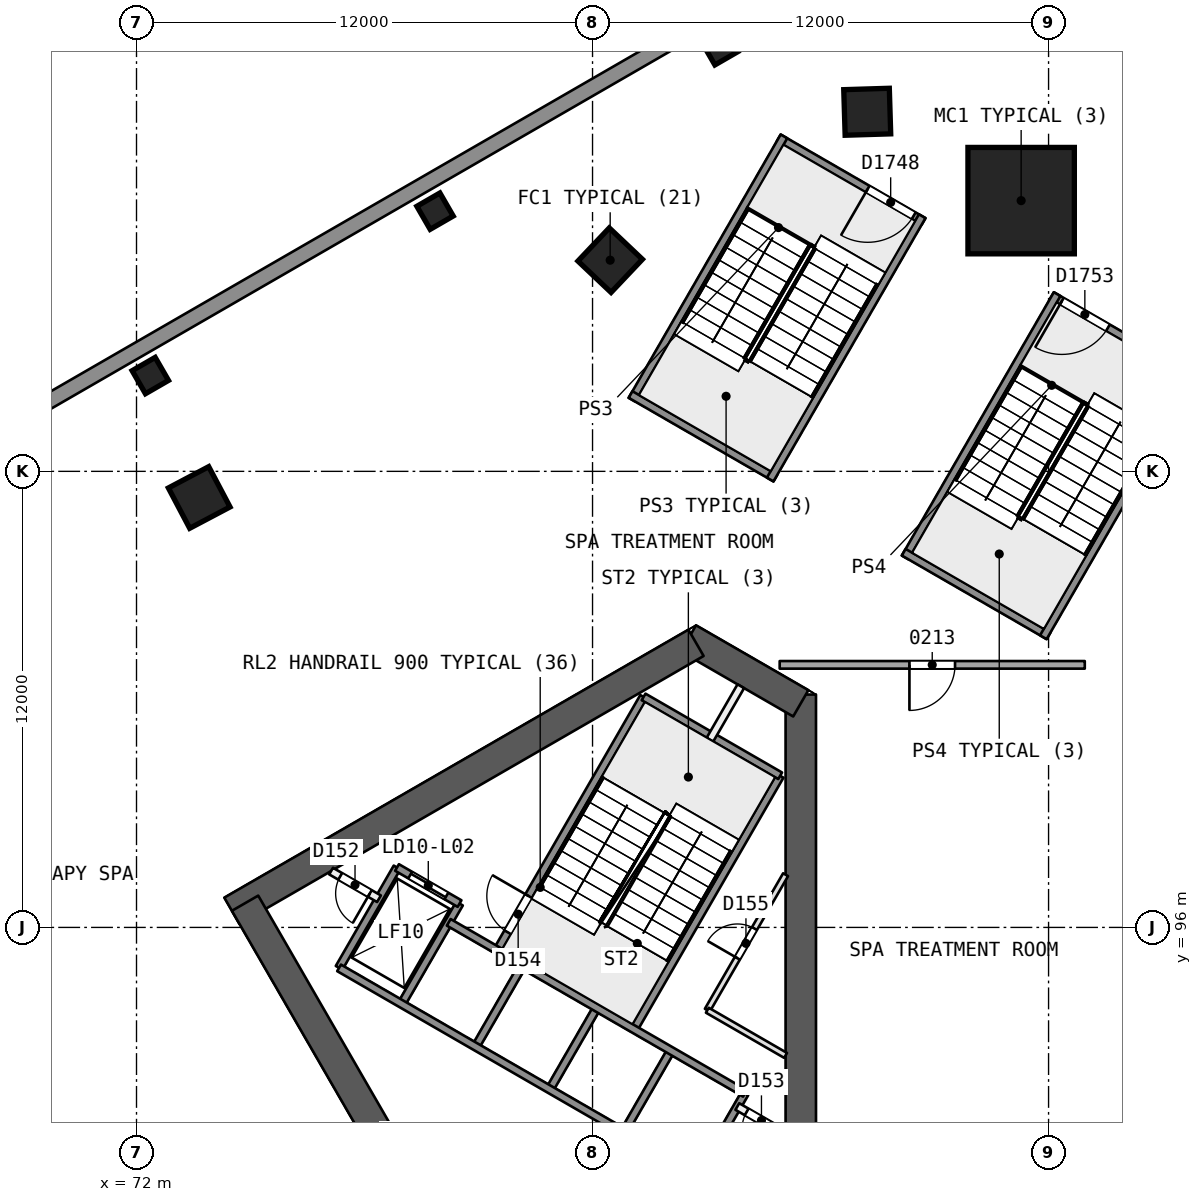
"""IFC4 building model, lengths in metres.
Left out: names, types, materials, properties, quantities, classifications, styles, units other than length and angle.
Written with IfcOpenShell. Run it as: python <this file> out.ifc"""

import sys

from ifc_helpers import new_model, si_unit, direction, frame, frame_2d, origin, origin_2d, place, context, subcontext, project, spatial, rectangle, extrude, element, fill, save


model = new_model("IFC4")
c1 = context("Model", 3, precision=1e-05, world=origin(), true_north=direction((0.0, 1.0)))
c2 = subcontext(c1, "Body", "Model", "MODEL_VIEW")
j1 = project(units=[si_unit("LENGTHUNIT", "METRE"), si_unit("PLANEANGLEUNIT", "RADIAN")], contexts=[c1])
p1 = place(None, origin())
s1 = spatial("IfcSite", under=j1, at=p1, CompositionType="ELEMENT")
p2 = place(p1, origin())
s2 = spatial("IfcBuilding", under=s1, at=p2, CompositionType="ELEMENT")
p3 = place(p2, frame((0.0, 0.0, 15.0)))
s3 = spatial("IfcBuildingStorey", under=s2, at=p3, CompositionType="ELEMENT", Elevation=15.0)
p4 = place(p3, frame((89.48, 88.194, 0.0), z_axis=(0.0, 0.0, 1.0), x_axis=(0.0, 1.0, 0.0)))
e1 = element("IfcWall", 1, at=p4, inside=s3, PredefinedType="SHEAR", context=c2, shape_type="SweptSolid", body=[
    extrude(rectangle(XDim=13.933, YDim=0.8, at=frame_2d((6.967, 0.0))), origin(), (0.0, 0.0, 1.0), 5.4),
])
p5 = place(p3, frame((89.48, 101.897, 0.0), z_axis=(0.0, 0.0, 1.0), x_axis=(-0.866034355626, 0.499984494636, 0.0)))
e2 = element("IfcWall", 2, at=p5, inside=s3, PredefinedType="SHEAR", context=c2, shape_type="SweptSolid", body=[
    extrude(rectangle(XDim=3.414, YDim=0.8, at=frame_2d((1.707, 0.0))), origin(), (0.0, 0.0, 1.0), 5.4),
])
p6 = place(p3, frame((86.723, 103.488, 0.0), z_axis=(0.0, 0.0, 1.0), x_axis=(-0.866032504327, -0.499987701298, 0.0)))
e3 = element("IfcWall", 3, at=p6, inside=s3, PredefinedType="SHEAR", context=c2, shape_type="SweptSolid", body=[
    extrude(rectangle(XDim=14.102, YDim=0.8, at=frame_2d((7.051, 0.0))), origin(), (0.0, 0.0, 1.0), 5.4),
])
p7 = place(p3, frame((74.856, 96.637, 0.0), z_axis=(0.0, 0.0, 1.0), x_axis=(0.499993500917, -0.866029155999, 0.0)))
e4 = element("IfcWall", 4, at=p7, inside=s3, PredefinedType="SHEAR", context=c2, shape_type="SweptSolid", body=[
    extrude(rectangle(XDim=9.98, YDim=0.8, at=frame_2d((4.99, 0.0))), origin(), (0.0, 0.0, 1.0), 5.4),
])
p8 = place(p7, frame((7.83, 0.0, 0.0)))
e5 = element("IfcOpeningElement", 5, at=p8, cuts=e4, PredefinedType="OPENING", context=c2, shape_type="SweptSolid", body=[
    extrude(rectangle(XDim=1.2, YDim=2.1, at=frame_2d((0.6, 1.05))), frame((0.0, 0.411, 0.0), z_axis=(0.0, -1.0, 0.0), x_axis=(1.0, 0.0, 0.0)), (0.0, 0.0, 1.0), 0.821),
])
p9 = place(p3, frame((95.3, 115.16, 0.0), z_axis=(-0.017576585263, -0.030499216073, 0.999380238683), x_axis=(0.499009854814, 0.865881069356, 0.035201399554)))
e6 = element("IfcColumn", 6, at=p9, inside=s3, PredefinedType="COLUMN", context=c2, shape_type="SweptSolid", body=[
    extrude(rectangle(XDim=2.8, YDim=2.8, at=origin_2d()), origin(), (0.0, 0.0, 1.0), 5.403),
])
p10 = place(p3, frame((84.474, 113.59, 0.0), z_axis=(-0.008405819998, -0.028109785153, 0.999569498419), x_axis=(0.866589254109, 0.49856697269, 0.021308176972)))
e7 = element("IfcColumn", 7, at=p10, inside=s3, PredefinedType="COLUMN", context=c2, shape_type="SweptSolid", body=[
    extrude(rectangle(XDim=1.2, YDim=1.2, at=origin_2d()), origin(), (0.0, 0.0, 1.0), 5.402),
])
p11 = place(p3, frame((73.649, 107.34, 0.0), z_axis=(0.000858805594, -0.02278094838, 0.999740111651), x_axis=(0.865998283321, 0.499933588876, 0.010648004404)))
e8 = element("IfcColumn", 8, at=p11, inside=s3, PredefinedType="COLUMN", context=c2, shape_type="SweptSolid", body=[
    extrude(rectangle(XDim=1.2, YDim=1.2, at=origin_2d()), origin(), (0.0, 0.0, 1.0), 5.401),
])
p12 = place(p3, frame((91.246, 117.5, 0.0), z_axis=(-0.015001048022, -0.031945002866, 0.999377048641), x_axis=(0.917716531026, -0.397234448643, 0.001077725523)))
e9 = element("IfcColumn", 9, at=p12, inside=s3, PredefinedType="COLUMN", context=c2, shape_type="SweptSolid", body=[
    extrude(rectangle(XDim=1.2, YDim=1.2, at=origin_2d()), origin(), (0.0, 0.0, 1.0), 5.403),
])
for number, where, z_axis, x_axis in (
    (10, (87.348, 119.172, 0.0), (0.0, 0.0, 1.0), (0.866, 0.5, 0.0)),
    (11, (79.855, 114.846, 0.0), (0.0, 0.0, 1.0), (0.866, 0.5, 0.0)),
    (12, (72.363, 110.521, 0.0), (0.0, 0.0, 1.0), (0.866, 0.5, 0.0)),
):
    element("IfcColumn", number, at=place(p3, frame(where, z_axis=z_axis, x_axis=x_axis)), inside=s3, PredefinedType="COLUMN", context=c2, shape_type="SweptSolid", body=[
        extrude(rectangle(XDim=0.7, YDim=0.7, at=origin_2d()), origin(), (0.0, 0.0, 1.0), 5.4),
    ])
p13 = place(p3, frame((96.953, 102.909, 0.0), z_axis=(0.0, 0.0, 1.0), x_axis=(-1.0, 0.0, 0.0)))
e13 = element("IfcWall", 13, at=p13, inside=s3, PredefinedType="PARTITIONING", context=c2, shape_type="SweptSolid", body=[
    extrude(rectangle(XDim=8.028, YDim=0.2, at=frame_2d((4.014, 0.0))), origin(), (0.0, 0.0, 1.0), 5.0),
])
p14 = place(p13, frame((3.414, 0.0, 0.0)))
e14 = element("IfcOpeningElement", 14, at=p14, cuts=e13, PredefinedType="OPENING", context=c2, shape_type="SweptSolid", body=[
    extrude(rectangle(XDim=1.2, YDim=2.4, at=frame_2d((0.6, 1.2))), frame((0.0, 0.11, 0.0), z_axis=(0.0, -1.0, 0.0), x_axis=(1.0, 0.0, 0.0)), (0.0, 0.0, 1.0), 0.221),
])
p15 = place(p3, frame((26.66, 85.0, 0.0), z_axis=(0.0, 0.0, 1.0), x_axis=(0.866025599265, 0.499999661418, 0.0)))
e15 = element("IfcWall", 15, at=p15, inside=s3, PredefinedType="SOLIDWALL", context=c2, shape_type="SweptSolid", body=[
    extrude(rectangle(XDim=78.727, YDim=0.4, at=frame_2d((39.364, 0.0))), origin(), (0.0, 0.0, 1.0), 5.0),
])
p16 = place(p15, frame((42.061, 0.0, 0.9)))
e16 = element("IfcOpeningElement", 16, at=p16, cuts=e15, PredefinedType="OPENING", context=c2, shape_type="SweptSolid", body=[
    extrude(rectangle(XDim=2.4, YDim=2.4, at=frame_2d((1.2, 1.2))), frame((0.0, 0.21, 0.0), z_axis=(0.0, -1.0, 0.0), x_axis=(1.0, 0.0, 0.0)), (0.0, 0.0, 1.0), 0.421),
])
p17 = place(p15, frame((34.267, 0.0, 0.9)))
e17 = element("IfcOpeningElement", 17, at=p17, cuts=e15, PredefinedType="OPENING", context=c2, shape_type="SweptSolid", body=[
    extrude(rectangle(XDim=2.4, YDim=2.4, at=frame_2d((1.2, 1.2))), frame((0.0, 0.21, 0.0), z_axis=(0.0, -1.0, 0.0), x_axis=(1.0, 0.0, 0.0)), (0.0, 0.0, 1.0), 0.421),
])
p18 = place(p3, frame((86.77, 89.486, 0.0), z_axis=(0.0, 0.0, 1.0), x_axis=(0.499961042966, 0.86604789447, 0.0)))
e18 = element("IfcWall", 18, at=p18, inside=s3, PredefinedType="SOLIDWALL", context=c2, shape_type="SweptSolid", body=[
    extrude(rectangle(XDim=2.48, YDim=0.2, at=frame_2d((1.24, 0.0))), origin(), (0.0, 0.0, 1.0), 5.0),
])
p19 = place(p3, frame((87.021, 93.821, 0.0), z_axis=(0.0, 0.0, 1.0), x_axis=(0.500028662945, 0.866008854593, 0.0)))
e19 = element("IfcWall", 19, at=p19, inside=s3, PredefinedType="PARTITIONING", context=c2, shape_type="SweptSolid", body=[
    extrude(rectangle(XDim=4.118, YDim=0.15, at=frame_2d((2.059, 0.0))), origin(), (0.0, 0.0, 1.0), 5.0),
])
p20 = place(p19, frame((1.582, 0.0, 0.0)))
e20 = element("IfcOpeningElement", 20, at=p20, cuts=e19, PredefinedType="OPENING", context=c2, shape_type="SweptSolid", body=[
    extrude(rectangle(XDim=0.9, YDim=2.1, at=frame_2d((0.45, 1.05))), frame((0.0, 0.085, 0.0), z_axis=(0.0, -1.0, 0.0), x_axis=(1.0, 0.0, 0.0)), (0.0, 0.0, 1.0), 0.171),
])
p21 = place(p3, frame((84.821, 90.611, 0.0), z_axis=(0.0, 0.0, 1.0), x_axis=(0.499961042966, 0.86604789447, 0.0)))
e21 = element("IfcWall", 21, at=p21, inside=s3, PredefinedType="SOLIDWALL", context=c2, shape_type="SweptSolid", body=[
    extrude(rectangle(XDim=2.48, YDim=0.2, at=frame_2d((1.24, 0.0))), origin(), (0.0, 0.0, 1.0), 5.0),
])
p22 = place(p3, frame((85.087, 93.321, 0.0), z_axis=(0.0, 0.0, 1.0), x_axis=(0.500019787375, 0.866013979237, 0.0)))
e22 = element("IfcWall", 22, at=p22, inside=s3, PredefinedType="SOLIDWALL", context=c2, shape_type="SweptSolid", body=[
    extrude(rectangle(XDim=7.7, YDim=0.2, at=frame_2d((3.85, 0.0))), origin(), (0.0, 0.0, 1.0), 5.0),
])
p23 = place(p3, frame((82.873, 91.736, 0.0), z_axis=(0.0, 0.0, 1.0), x_axis=(0.499961042966, 0.86604789447, 0.0)))
e23 = element("IfcWall", 23, at=p23, inside=s3, PredefinedType="SOLIDWALL", context=c2, shape_type="SweptSolid", body=[
    extrude(rectangle(XDim=2.48, YDim=0.2, at=frame_2d((1.24, 0.0))), origin(), (0.0, 0.0, 1.0), 5.0),
])
p24 = place(p3, frame((87.09, 100.94, 0.0), z_axis=(0.0, 0.0, 1.0), x_axis=(0.499956811548, 0.866050337213, 0.0)))
e24 = element("IfcWall", 24, at=p24, inside=s3, PredefinedType="PARTITIONING", context=c2, shape_type="SweptSolid", body=[
    extrude(rectangle(XDim=1.623, YDim=0.2, at=frame_2d((0.812, 0.0))), origin(), (0.0, 0.0, 1.0), 5.0),
])
p25 = place(p3, frame((80.924, 92.861, 0.0), z_axis=(0.0, 0.0, 1.0), x_axis=(0.499961042966, 0.86604789447, 0.0)))
e25 = element("IfcWall", 25, at=p25, inside=s3, PredefinedType="SOLIDWALL", context=c2, shape_type="SweptSolid", body=[
    extrude(rectangle(XDim=2.48, YDim=0.2, at=frame_2d((1.24, 0.0))), origin(), (0.0, 0.0, 1.0), 5.0),
])
p26 = place(p3, frame((81.493, 95.396, 0.0), z_axis=(0.0, 0.0, 1.0), x_axis=(0.500006057782, 0.866021906294, 0.0)))
e26 = element("IfcWall", 26, at=p26, inside=s3, PredefinedType="SOLIDWALL", context=c2, shape_type="SweptSolid", body=[
    extrude(rectangle(XDim=7.7, YDim=0.2, at=frame_2d((3.85, 0.0))), origin(), (0.0, 0.0, 1.0), 5.0),
])
p27 = place(p26, frame((0.55, 0.0, 0.0)))
e27 = element("IfcOpeningElement", 27, at=p27, cuts=e26, PredefinedType="OPENING", context=c2, shape_type="SweptSolid", body=[
    extrude(rectangle(XDim=1.1, YDim=2.1, at=frame_2d((0.55, 1.05))), frame((0.0, 0.11, 0.0), z_axis=(0.0, -1.0, 0.0), x_axis=(1.0, 0.0, 0.0)), (0.0, 0.0, 1.0), 0.221),
])
for number, where, z_axis, x_axis in (
    (28, (78.976, 93.986, 0.0), (0.0, 0.0, 1.0), (0.5, 0.866, 0.0)),
    (29, (77.33, 94.936, 0.0), (0.0, 0.0, 1.0), (0.5, 0.866, 0.0)),
):
    element("IfcWall", number, at=place(p3, frame(where, z_axis=z_axis, x_axis=x_axis)), inside=s3, PredefinedType="SOLIDWALL", context=c2, shape_type="SweptSolid", body=[
        extrude(rectangle(XDim=3.05, YDim=0.2, at=frame_2d((1.525, 0.0))), origin(), (0.0, 0.0, 1.0), 5.0),
    ])
p28 = place(p3, frame((86.77, 89.486, 0.0), z_axis=(0.0, 0.0, 1.0), x_axis=(-0.86601811187, 0.500012629753, 0.0)))
e30 = element("IfcWall", 30, at=p28, inside=s3, PredefinedType="SOLIDWALL", context=c2, shape_type="SweptSolid", body=[
    extrude(rectangle(XDim=10.9, YDim=0.2, at=frame_2d((5.45, 0.0))), origin(), (0.0, 0.0, 1.0), 5.0),
])
p29 = place(p3, frame((89.08, 90.554, 0.0), z_axis=(0.0, 0.0, 1.0), x_axis=(-0.866022048785, 0.500005810984, 0.0)))
e31 = element("IfcWall", 31, at=p29, inside=s3, PredefinedType="PARTITIONING", context=c2, shape_type="SweptSolid", body=[
    extrude(rectangle(XDim=1.467, YDim=0.2, at=frame_2d((0.733, 0.0))), origin(), (0.0, 0.0, 1.0), 5.0),
])
p30 = place(p29, frame((0.283, 0.0, 0.0)))
e32 = element("IfcOpeningElement", 32, at=p30, cuts=e31, PredefinedType="OPENING", context=c2, shape_type="SweptSolid", body=[
    extrude(rectangle(XDim=0.9, YDim=2.1, at=frame_2d((0.45, 1.05))), frame((0.0, 0.11, 0.0), z_axis=(0.0, -1.0, 0.0), x_axis=(1.0, 0.0, 0.0)), (0.0, 0.0, 1.0), 0.221),
])
p31 = place(p3, frame((78.38, 96.755, 0.0), z_axis=(0.0, 0.0, 1.0), x_axis=(-0.866003949776, 0.500037157592, 0.0)))
e33 = element("IfcWall", 33, at=p31, inside=s3, PredefinedType="PARTITIONING", context=c2, shape_type="SweptSolid", body=[
    extrude(rectangle(XDim=1.455, YDim=0.2, at=frame_2d((0.728, 0.0))), origin(), (0.0, 0.0, 1.0), 5.0),
])
p32 = place(p31, frame((0.278, 0.0, 0.0)))
e34 = element("IfcOpeningElement", 34, at=p32, cuts=e33, PredefinedType="OPENING", context=c2, shape_type="SweptSolid", body=[
    extrude(rectangle(XDim=0.9, YDim=2.1, at=frame_2d((0.45, 1.05))), frame((0.0, 0.11, 0.0), z_axis=(0.0, -1.0, 0.0), x_axis=(1.0, 0.0, 0.0)), (0.0, 0.0, 1.0), 0.221),
])
p33 = place(p3, frame((88.01, 91.634, 0.0), z_axis=(0.0, 0.0, 1.0), x_axis=(-0.866024315419, 0.5000018851, 0.0)))
e35 = element("IfcWall", 35, at=p33, inside=s3, PredefinedType="SOLIDWALL", context=c2, shape_type="SweptSolid", body=[
    extrude(rectangle(XDim=9.0, YDim=0.2, at=frame_2d((4.5, 0.0))), origin(), (0.0, 0.0, 1.0), 5.0),
])
p34 = place(p3, frame((80.5, 96.627, 0.0), z_axis=(0.0, 0.0, 1.0), x_axis=(-0.86601224135, 0.500022797313, 0.0)))
e36 = element("IfcWall", 36, at=p34, inside=s3, PredefinedType="SOLIDWALL", context=c2, shape_type="SweptSolid", body=[
    extrude(rectangle(XDim=1.9, YDim=0.2, at=frame_2d((0.95, 0.0))), origin(), (0.0, 0.0, 1.0), 5.0),
])
p35 = place(p34, frame((0.4, 0.0, 0.0)))
e37 = element("IfcOpeningElement", 37, at=p35, cuts=e36, PredefinedType="OPENING", context=c2, shape_type="SweptSolid", body=[
    extrude(rectangle(XDim=1.1, YDim=2.1, at=frame_2d((0.55, 1.05))), frame((0.0, 0.11, 0.0), z_axis=(0.0, -1.0, 0.0), x_axis=(1.0, 0.0, 0.0)), (0.0, 0.0, 1.0), 0.221),
])
p36 = place(p3, frame((89.08, 92.632, 0.0), z_axis=(0.0, 0.0, 1.0), x_axis=(-0.866041951395, 0.499971337603, 0.0)))
e38 = element("IfcWall", 38, at=p36, inside=s3, PredefinedType="PARTITIONING", context=c2, shape_type="SweptSolid", body=[
    extrude(rectangle(XDim=2.378, YDim=0.15, at=frame_2d((1.189, 0.0))), origin(), (0.0, 0.0, 1.0), 5.0),
])
p37 = place(p3, frame((88.937, 99.99, 0.0), z_axis=(0.0, 0.0, 1.0), x_axis=(-0.866004344652, 0.500036473714, 0.0)))
e39 = element("IfcWall", 39, at=p37, inside=s3, PredefinedType="SOLIDWALL", context=c2, shape_type="SweptSolid", body=[
    extrude(rectangle(XDim=4.15, YDim=0.2, at=frame_2d((2.075, 0.0))), origin(), (0.0, 0.0, 1.0), 5.0),
])
p38 = place(p3, frame((92.711, 114.577, -0.4), z_axis=(0.0, 0.0, 1.0), x_axis=(-0.866032203192, 0.499988222896, 0.0)))
e40 = element("IfcWall", 40, at=p38, inside=s3, PredefinedType="SOLIDWALL", context=c2, shape_type="SweptSolid", body=[
    extrude(rectangle(XDim=4.4, YDim=0.2, at=frame_2d((2.2, 0.0))), origin(), (0.0, 0.0, 1.0), 5.4),
])
p39 = place(p38, frame((0.3, 0.0, 0.4)))
e41 = element("IfcOpeningElement", 41, at=p39, cuts=e40, PredefinedType="OPENING", context=c2, shape_type="SweptSolid", body=[
    extrude(rectangle(XDim=1.4, YDim=2.1, at=frame_2d((0.7, 1.05))), frame((0.0, 0.11, 0.0), z_axis=(0.0, -1.0, 0.0), x_axis=(1.0, 0.0, 0.0)), (0.0, 0.0, 1.0), 0.221),
])
p40 = place(p3, frame((89.037, 116.813, -0.4), z_axis=(0.0, 0.0, 1.0), x_axis=(-0.49999894854, -0.866026010844, 0.0)))
e42 = element("IfcWall", 42, at=p40, inside=s3, PredefinedType="SOLIDWALL", context=c2, shape_type="SweptSolid", body=[
    extrude(rectangle(XDim=8.0, YDim=0.2, at=frame_2d((4.0, 0.0))), origin(), (0.0, 0.0, 1.0), 5.4),
])
p41 = place(p3, frame((85.001, 110.022, -0.4), z_axis=(0.0, 0.0, 1.0), x_axis=(0.866032203192, -0.499988222896, 0.0)))
e43 = element("IfcWall", 43, at=p41, inside=s3, PredefinedType="SOLIDWALL", context=c2, shape_type="SweptSolid", body=[
    extrude(rectangle(XDim=4.4, YDim=0.2, at=frame_2d((2.2, 0.0))), origin(), (0.0, 0.0, 1.0), 5.4),
])
p42 = place(p3, frame((88.675, 107.785, -0.4), z_axis=(0.0, 0.0, 1.0), x_axis=(0.49999894854, 0.866026010844, 0.0)))
e44 = element("IfcWall", 44, at=p42, inside=s3, PredefinedType="SOLIDWALL", context=c2, shape_type="SweptSolid", body=[
    extrude(rectangle(XDim=8.0, YDim=0.2, at=frame_2d((4.0, 0.0))), origin(), (0.0, 0.0, 1.0), 5.4),
])
p43 = place(p3, frame((99.899, 110.427, -0.4), z_axis=(0.0, 0.0, 1.0), x_axis=(-0.866018331238, 0.50001224981, 0.0)))
e45 = element("IfcWall", 45, at=p43, inside=s3, PredefinedType="SOLIDWALL", context=c2, shape_type="SweptSolid", body=[
    extrude(rectangle(XDim=4.4, YDim=0.2, at=frame_2d((2.2, 0.0))), origin(), (0.0, 0.0, 1.0), 5.4),
])
p44 = place(p43, frame((2.7, 0.0, 0.4)))
e46 = element("IfcOpeningElement", 46, at=p44, cuts=e45, PredefinedType="OPENING", context=c2, shape_type="SweptSolid", body=[
    extrude(rectangle(XDim=1.4, YDim=2.1, at=frame_2d((0.7, 1.05))), frame((0.0, 0.11, 0.0), z_axis=(0.0, -1.0, 0.0), x_axis=(1.0, 0.0, 0.0)), (0.0, 0.0, 1.0), 0.221),
])
p45 = place(p3, frame((96.225, 112.663, -0.4), z_axis=(0.0, 0.0, 1.0), x_axis=(-0.49999894854, -0.866026010844, 0.0)))
e47 = element("IfcWall", 47, at=p45, inside=s3, PredefinedType="SOLIDWALL", context=c2, shape_type="SweptSolid", body=[
    extrude(rectangle(XDim=8.0, YDim=0.2, at=frame_2d((4.0, 0.0))), origin(), (0.0, 0.0, 1.0), 5.4),
])
p46 = place(p3, frame((92.189, 105.872, -0.4), z_axis=(0.0, 0.0, 1.0), x_axis=(0.866032203192, -0.499988222896, 0.0)))
e48 = element("IfcWall", 48, at=p46, inside=s3, PredefinedType="SOLIDWALL", context=c2, shape_type="SweptSolid", body=[
    extrude(rectangle(XDim=4.4, YDim=0.2, at=frame_2d((2.2, 0.0))), origin(), (0.0, 0.0, 1.0), 5.4),
])
p47 = place(p3, frame((95.863, 103.635, -0.4), z_axis=(0.0, 0.0, 1.0), x_axis=(0.49999894854, 0.866026010844, 0.0)))
e49 = element("IfcWall", 49, at=p47, inside=s3, PredefinedType="SOLIDWALL", context=c2, shape_type="SweptSolid", body=[
    extrude(rectangle(XDim=8.0, YDim=0.2, at=frame_2d((4.0, 0.0))), origin(), (0.0, 0.0, 1.0), 5.4),
])
p48 = place(p14, origin())
e50 = element("IfcDoor", 50, at=p48, inside=s3, OperationType="SINGLE_SWING_RIGHT", PredefinedType="NOTDEFINED", context=c2, shape_type="SweptSolid", body=[
    extrude(rectangle(XDim=1.2, YDim=2.4, at=frame_2d((0.6, 1.2))), frame((0.0, 0.025, 0.0), z_axis=(0.0, -1.0, 0.0), x_axis=(1.0, 0.0, 0.0)), (0.0, 0.0, 1.0), 0.05),
])
fill(e14, e50)
p49 = place(p35, origin())
e51 = element("IfcDoor", 51, at=p49, inside=s3, OperationType="SLIDING_TO_RIGHT", PredefinedType="NOTDEFINED", context=c2, shape_type="SweptSolid", body=[
    extrude(rectangle(XDim=1.1, YDim=2.1, at=frame_2d((0.55, 1.05))), frame((0.0, 0.025, 0.0), z_axis=(0.0, -1.0, 0.0), x_axis=(1.0, 0.0, 0.0)), (0.0, 0.0, 1.0), 0.05),
])
fill(e37, e51)
p50 = place(p32, origin())
e52 = element("IfcDoor", 52, at=p50, inside=s3, OperationType="SINGLE_SWING_LEFT", PredefinedType="NOTDEFINED", context=c2, shape_type="SweptSolid", body=[
    extrude(rectangle(XDim=0.9, YDim=2.1, at=frame_2d((0.45, 1.05))), frame((0.0, 0.025, 0.0), z_axis=(0.0, -1.0, 0.0), x_axis=(1.0, 0.0, 0.0)), (0.0, 0.0, 1.0), 0.05),
])
fill(e34, e52)
p51 = place(p30, origin())
e53 = element("IfcDoor", 53, at=p51, inside=s3, OperationType="SINGLE_SWING_LEFT", PredefinedType="NOTDEFINED", context=c2, shape_type="SweptSolid", body=[
    extrude(rectangle(XDim=0.9, YDim=2.1, at=frame_2d((0.45, 1.05))), frame((0.0, 0.025, 0.0), z_axis=(0.0, -1.0, 0.0), x_axis=(1.0, 0.0, 0.0)), (0.0, 0.0, 1.0), 0.05),
])
fill(e32, e53)
p52 = place(p27, origin())
e54 = element("IfcDoor", 54, at=p52, inside=s3, OperationType="SINGLE_SWING_RIGHT", PredefinedType="NOTDEFINED", context=c2, shape_type="SweptSolid", body=[
    extrude(rectangle(XDim=1.1, YDim=2.1, at=frame_2d((0.55, 1.05))), frame((0.0, 0.025, 0.0), z_axis=(0.0, -1.0, 0.0), x_axis=(1.0, 0.0, 0.0)), (0.0, 0.0, 1.0), 0.05),
])
fill(e27, e54)
p53 = place(p20, origin())
e55 = element("IfcDoor", 55, at=p53, inside=s3, OperationType="SINGLE_SWING_LEFT", PredefinedType="NOTDEFINED", context=c2, shape_type="SweptSolid", body=[
    extrude(rectangle(XDim=0.9, YDim=2.1, at=frame_2d((0.45, 1.05))), frame((0.0, 0.025, 0.0), z_axis=(0.0, -1.0, 0.0), x_axis=(1.0, 0.0, 0.0)), (0.0, 0.0, 1.0), 0.05),
])
fill(e20, e55)
p54 = place(p39, origin())
e56 = element("IfcDoor", 56, at=p54, inside=s3, OperationType="SINGLE_SWING_RIGHT", PredefinedType="NOTDEFINED", context=c2, shape_type="SweptSolid", body=[
    extrude(rectangle(XDim=1.4, YDim=2.1, at=frame_2d((0.7, 1.05))), frame((0.0, 0.025, 0.0), z_axis=(0.0, -1.0, 0.0), x_axis=(1.0, 0.0, 0.0)), (0.0, 0.0, 1.0), 0.05),
])
fill(e41, e56)
p55 = place(p44, origin())
e57 = element("IfcDoor", 57, at=p55, inside=s3, OperationType="SINGLE_SWING_RIGHT", PredefinedType="NOTDEFINED", context=c2, shape_type="SweptSolid", body=[
    extrude(rectangle(XDim=1.4, YDim=2.1, at=frame_2d((0.7, 1.05))), frame((0.0, 0.025, 0.0), z_axis=(0.0, -1.0, 0.0), x_axis=(1.0, 0.0, 0.0)), (0.0, 0.0, 1.0), 0.05),
])
fill(e46, e57)
save(model, sys.argv[1])
